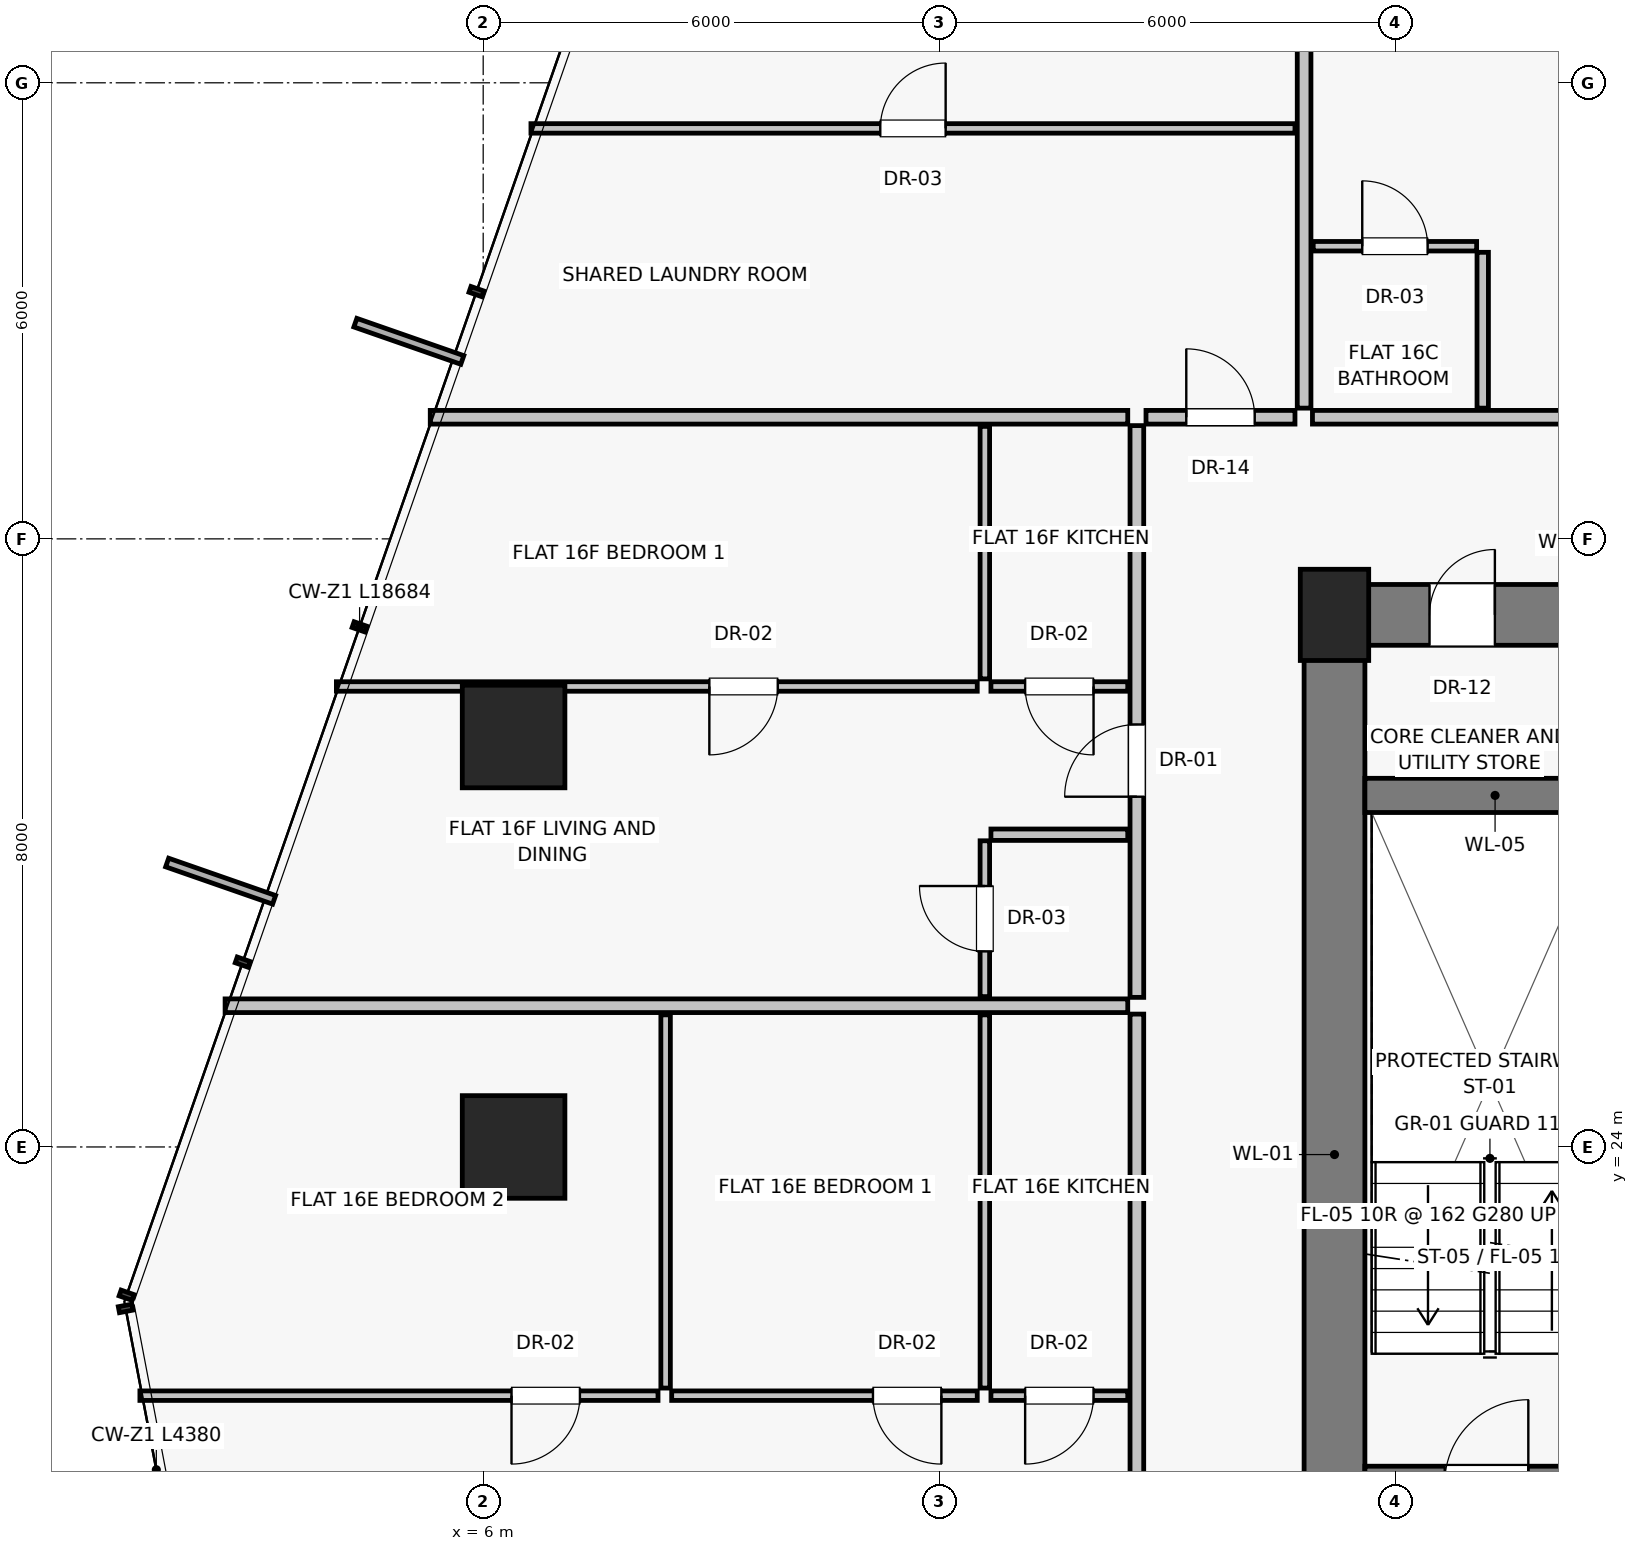
"""IFC4 building model, lengths in metres.
Left out: names, types, materials, properties, quantities, classifications, styles, units other than length and angle.
Written with IfcOpenShell. Run it as: python <this file> out.ifc"""

import sys

from ifc_helpers import new_model, si_unit, direction, frame, frame_2d, origin, origin_2d, place, context, subcontext, project, spatial, rectangle, extrude, source, transform, mapped, element, fill, save


model = new_model("IFC4")
c1 = context("Model", 3, precision=1e-05, world=origin(), true_north=direction((0.0, 1.0)))
c2 = subcontext(c1, "Body", "Model", "MODEL_VIEW")
j1 = project(units=[si_unit("LENGTHUNIT", "METRE"), si_unit("PLANEANGLEUNIT", "RADIAN")], contexts=[c1])
p1 = place(None, origin())
s1 = spatial("IfcSite", under=j1, at=p1, CompositionType="ELEMENT")
p2 = place(p1, origin())
s2 = spatial("IfcBuilding", under=s1, at=p2, CompositionType="ELEMENT")
p3 = place(p2, frame((0.0, 0.0, 60.85)))
s3 = spatial("IfcBuildingStorey", under=s2, at=p3, CompositionType="ELEMENT", Elevation=60.85)
p4 = place(p3, frame((17.2, 31.0, 0.0), z_axis=(0.0, 0.0, 1.0), x_axis=(1.0, 0.0, 0.0)))
e1 = element("IfcColumn", 1, at=p4, inside=s3, PredefinedType="PILASTER", context=c2, shape_type="SweptSolid", body=[
    extrude(rectangle(XDim=0.9, YDim=1.2, at=origin_2d()), origin(), (0.0, 0.0, 1.0), 3.25),
])
for number, where, z_axis, x_axis in (
    (2, (6.4, 29.4, 0.0), (0.0, 0.0, 1.0), (1.0, 0.0, 0.0)),
    (3, (6.4, 24.0, 0.0), (0.0, 0.0, 1.0), (1.0, 0.0, 0.0)),
):
    element("IfcColumn", number, at=place(p3, frame(where, z_axis=z_axis, x_axis=x_axis)), inside=s3, PredefinedType="COLUMN", context=c2, shape_type="SweptSolid", body=[
        extrude(rectangle(XDim=1.35, YDim=1.35, at=origin_2d()), origin(), (0.0, 0.0, 1.0), 3.25),
    ])
p5 = place(p3, frame((17.2, 16.8, 0.0), z_axis=(0.0, 0.0, 1.0), x_axis=(0.0, 1.0, 0.0)))
e4 = element("IfcWall", 4, at=p5, inside=s3, PredefinedType="SHEAR", context=c2, shape_type="SweptSolid", body=[
    extrude(rectangle(XDim=14.2, YDim=0.8, at=frame_2d((7.1, 0.0))), origin(), (0.0, 0.0, 1.0), 3.0),
])
p6 = place(p3, frame((17.2, 31.0, 0.0), z_axis=(0.0, 0.0, 1.0), x_axis=(1.0, 0.0, 0.0)))
e5 = element("IfcWall", 5, at=p6, inside=s3, PredefinedType="SHEAR", context=c2, shape_type="SweptSolid", body=[
    extrude(rectangle(XDim=3.8, YDim=0.8, at=frame_2d((1.9, 0.0))), origin(), (0.0, 0.0, 1.0), 3.0),
])
p7 = place(p6, frame((1.25, 0.0, 0.0)))
e6 = element("IfcOpeningElement", 6, at=p7, cuts=e5, PredefinedType="OPENING", context=c2, shape_type="SweptSolid", body=[
    extrude(rectangle(XDim=0.86, YDim=2.01, at=frame_2d((0.43, 1.005))), frame((0.0, 0.41, 0.0), z_axis=(0.0, -1.0, 0.0), x_axis=(1.0, 0.0, 0.0)), (0.0, 0.0, 1.0), 0.82),
])
p8 = place(p3, frame((17.6, 19.575, 0.0), z_axis=(0.0, 0.0, 1.0), x_axis=(1.0, 0.0, 0.0)))
e7 = element("IfcWall", 7, at=p8, inside=s3, PredefinedType="SHEAR", context=c2, shape_type="SweptSolid", body=[
    extrude(rectangle(XDim=3.425, YDim=0.45, at=frame_2d((1.712, 0.0))), origin(), (0.0, 0.0, 1.0), 3.0),
])
p9 = place(p8, frame((1.05, 0.0, 0.0)))
e8 = element("IfcOpeningElement", 8, at=p9, cuts=e7, PredefinedType="OPENING", context=c2, shape_type="SweptSolid", body=[
    extrude(rectangle(XDim=1.1, YDim=2.03, at=frame_2d((0.55, 1.015))), frame((0.0, 0.235, 0.0), z_axis=(0.0, -1.0, 0.0), x_axis=(1.0, 0.0, 0.0)), (0.0, 0.0, 1.0), 0.47),
])
p10 = place(p3, frame((17.6, 28.625, 0.0), z_axis=(0.0, 0.0, 1.0), x_axis=(1.0, 0.0, 0.0)))
e9 = element("IfcWall", 9, at=p10, inside=s3, PredefinedType="SHEAR", context=c2, shape_type="SweptSolid", body=[
    extrude(rectangle(XDim=3.425, YDim=0.45, at=frame_2d((1.712, 0.0))), origin(), (0.0, 0.0, 1.0), 3.0),
])
p11 = place(p3, frame((16.8, 33.72, 0.0), z_axis=(0.0, 0.0, 1.0), x_axis=(0.0, 1.0, 0.0)))
e10 = element("IfcWall", 10, at=p11, inside=s3, PredefinedType="PARTITIONING", context=c2, shape_type="SweptSolid", body=[
    extrude(rectangle(XDim=10.098, YDim=0.18, at=frame_2d((5.049, 0.0))), origin(), (0.0, 0.0, 1.0), 3.0),
])
p12 = place(p3, frame((16.91, 33.6, 0.0), z_axis=(0.0, 0.0, 1.0), x_axis=(1.0, 0.0, 0.0)))
e11 = element("IfcWall", 11, at=p12, inside=s3, PredefinedType="PARTITIONING", context=c2, shape_type="SweptSolid", body=[
    extrude(rectangle(XDim=5.638, YDim=0.18, at=frame_2d((2.819, 0.0))), origin(), (0.0, 0.0, 1.0), 3.0),
])
p13 = place(p12, frame((3.373, 0.0, 0.0)))
e12 = element("IfcOpeningElement", 12, at=p13, cuts=e11, PredefinedType="OPENING", context=c2, shape_type="SweptSolid", body=[
    extrude(rectangle(XDim=0.95, YDim=2.02, at=frame_2d((0.475, 1.01))), frame((0.0, 0.1, 0.0), z_axis=(0.0, -1.0, 0.0), x_axis=(1.0, 0.0, 0.0)), (0.0, 0.0, 1.0), 0.2),
])
p14 = place(p3, frame((19.15, 33.72, 0.0), z_axis=(0.0, 0.0, 1.0), x_axis=(0.0, 1.0, 0.0)))
e13 = element("IfcWall", 13, at=p14, inside=s3, PredefinedType="PARTITIONING", context=c2, shape_type="SweptSolid", body=[
    extrude(rectangle(XDim=2.05, YDim=0.15, at=frame_2d((1.025, 0.0))), origin(), (0.0, 0.0, 1.0), 3.0),
])
p15 = place(p3, frame((16.92, 35.85, 0.0), z_axis=(0.0, 0.0, 1.0), x_axis=(1.0, 0.0, 0.0)))
e14 = element("IfcWall", 14, at=p15, inside=s3, PredefinedType="PARTITIONING", context=c2, shape_type="SweptSolid", body=[
    extrude(rectangle(XDim=2.15, YDim=0.125, at=frame_2d((1.075, 0.0))), origin(), (0.0, 0.0, 1.0), 3.0),
])
p16 = place(p15, frame((0.645, 0.0, 0.0)))
e15 = element("IfcOpeningElement", 15, at=p16, cuts=e14, PredefinedType="OPENING", context=c2, shape_type="SweptSolid", body=[
    extrude(rectangle(XDim=0.86, YDim=2.01, at=frame_2d((0.43, 1.005))), frame((0.0, 0.073, 0.0), z_axis=(0.0, -1.0, 0.0), x_axis=(1.0, 0.0, 0.0)), (0.0, 0.0, 1.0), 0.145),
])
p17 = place(p3, frame((14.48, 33.6, 0.0), z_axis=(0.0, 0.0, 1.0), x_axis=(-1.0, 0.0, 0.0)))
e16 = element("IfcWall", 16, at=p17, inside=s3, PredefinedType="PARTITIONING", context=c2, shape_type="SweptSolid", body=[
    extrude(rectangle(XDim=9.176, YDim=0.18, at=frame_2d((4.588, 0.0))), origin(), (0.0, 0.0, 1.0), 3.0),
])
p18 = place(p3, frame((14.6, 14.31, 0.0), z_axis=(0.0, 0.0, 1.0), x_axis=(0.0, 1.0, 0.0)))
e17 = element("IfcWall", 17, at=p18, inside=s3, PredefinedType="PARTITIONING", context=c2, shape_type="SweptSolid", body=[
    extrude(rectangle(XDim=11.438, YDim=0.18, at=frame_2d((5.719, 0.0))), origin(), (0.0, 0.0, 1.0), 3.0),
])
p19 = place(p18, frame((3.804, 0.0, 0.0)))
e18 = element("IfcOpeningElement", 18, at=p19, cuts=e17, PredefinedType="OPENING", context=c2, shape_type="SweptSolid", body=[
    extrude(rectangle(XDim=0.95, YDim=2.02, at=frame_2d((0.475, 1.01))), frame((0.0, 0.1, 0.0), z_axis=(0.0, -1.0, 0.0), x_axis=(1.0, 0.0, 0.0)), (0.0, 0.0, 1.0), 0.2),
])
p20 = place(p3, frame((14.48, 20.728, 0.0), z_axis=(0.0, 0.0, 1.0), x_axis=(-1.0, 0.0, 0.0)))
e19 = element("IfcWall", 19, at=p20, inside=s3, PredefinedType="PARTITIONING", context=c2, shape_type="SweptSolid", body=[
    extrude(rectangle(XDim=1.8, YDim=0.125, at=frame_2d((0.9, 0.0))), origin(), (0.0, 0.0, 1.0), 3.0),
])
p21 = place(p20, frame((0.45, 0.0, 0.0)))
e20 = element("IfcOpeningElement", 20, at=p21, cuts=e19, PredefinedType="OPENING", context=c2, shape_type="SweptSolid", body=[
    extrude(rectangle(XDim=0.9, YDim=2.01, at=frame_2d((0.45, 1.005))), frame((0.0, 0.073, 0.0), z_axis=(0.0, -1.0, 0.0), x_axis=(1.0, 0.0, 0.0)), (0.0, 0.0, 1.0), 0.145),
])
for number, where, z_axis, x_axis in (
    (21, (12.6, 20.828, 0.0), (0.0, 0.0, 1.0), (0.0, 1.0, 0.0)),
    (22, (8.4, 20.828, 0.0), (0.0, 0.0, 1.0), (0.0, 1.0, 0.0)),
):
    element("IfcWall", number, at=place(p3, frame(where, z_axis=z_axis, x_axis=x_axis)), inside=s3, PredefinedType="PARTITIONING", context=c2, shape_type="SweptSolid", body=[
        extrude(rectangle(XDim=4.91, YDim=0.125, at=frame_2d((2.455, 0.0))), origin(), (0.0, 0.0, 1.0), 3.0),
    ])
p22 = place(p3, frame((12.5, 20.728, 0.0), z_axis=(0.0, 0.0, 1.0), x_axis=(-1.0, 0.0, 0.0)))
e23 = element("IfcWall", 23, at=p22, inside=s3, PredefinedType="PARTITIONING", context=c2, shape_type="SweptSolid", body=[
    extrude(rectangle(XDim=4.02, YDim=0.125, at=frame_2d((2.01, 0.0))), origin(), (0.0, 0.0, 1.0), 3.0),
])
p23 = place(p22, frame((0.472, 0.0, 0.0)))
e24 = element("IfcOpeningElement", 24, at=p23, cuts=e23, PredefinedType="OPENING", context=c2, shape_type="SweptSolid", body=[
    extrude(rectangle(XDim=0.9, YDim=2.01, at=frame_2d((0.45, 1.005))), frame((0.0, 0.073, 0.0), z_axis=(0.0, -1.0, 0.0), x_axis=(1.0, 0.0, 0.0)), (0.0, 0.0, 1.0), 0.145),
])
p24 = place(p3, frame((8.3, 20.728, 0.0), z_axis=(0.0, 0.0, 1.0), x_axis=(-1.0, 0.0, 0.0)))
e25 = element("IfcWall", 25, at=p24, inside=s3, PredefinedType="PARTITIONING", context=c2, shape_type="SweptSolid", body=[
    extrude(rectangle(XDim=6.816, YDim=0.125, at=frame_2d((3.408, 0.0))), origin(), (0.0, 0.0, 1.0), 3.0),
])
p25 = place(p24, frame((1.027, 0.0, 0.0)))
e26 = element("IfcOpeningElement", 26, at=p25, cuts=e25, PredefinedType="OPENING", context=c2, shape_type="SweptSolid", body=[
    extrude(rectangle(XDim=0.9, YDim=2.01, at=frame_2d((0.45, 1.005))), frame((0.0, 0.073, 0.0), z_axis=(0.0, -1.0, 0.0), x_axis=(1.0, 0.0, 0.0)), (0.0, 0.0, 1.0), 0.145),
])
p26 = place(p3, frame((14.48, 25.858, 0.0), z_axis=(0.0, 0.0, 1.0), x_axis=(-1.0, 0.0, 0.0)))
e27 = element("IfcWall", 27, at=p26, inside=s3, PredefinedType="PARTITIONING", context=c2, shape_type="SweptSolid", body=[
    extrude(rectangle(XDim=11.875, YDim=0.18, at=frame_2d((5.938, 0.0))), origin(), (0.0, 0.0, 1.0), 3.0),
])
p27 = place(p3, frame((14.6, 25.968, 0.0), z_axis=(0.0, 0.0, 1.0), x_axis=(0.0, 1.0, 0.0)))
e28 = element("IfcWall", 28, at=p27, inside=s3, PredefinedType="PARTITIONING", context=c2, shape_type="SweptSolid", body=[
    extrude(rectangle(XDim=7.522, YDim=0.18, at=frame_2d((3.761, 0.0))), origin(), (0.0, 0.0, 1.0), 3.0),
])
p28 = place(p27, frame((2.64, 0.0, 0.0)))
e29 = element("IfcOpeningElement", 29, at=p28, cuts=e28, PredefinedType="OPENING", context=c2, shape_type="SweptSolid", body=[
    extrude(rectangle(XDim=0.95, YDim=2.02, at=frame_2d((0.475, 1.01))), frame((0.0, 0.1, 0.0), z_axis=(0.0, -1.0, 0.0), x_axis=(1.0, 0.0, 0.0)), (0.0, 0.0, 1.0), 0.2),
])
p29 = place(p3, frame((14.48, 28.108, 0.0), z_axis=(0.0, 0.0, 1.0), x_axis=(-1.0, 0.0, 0.0)))
e30 = element("IfcWall", 30, at=p29, inside=s3, PredefinedType="PARTITIONING", context=c2, shape_type="SweptSolid", body=[
    extrude(rectangle(XDim=1.8, YDim=0.15, at=frame_2d((0.9, 0.0))), origin(), (0.0, 0.0, 1.0), 3.0),
])
p30 = place(p3, frame((12.6, 25.978, 0.0), z_axis=(0.0, 0.0, 1.0), x_axis=(0.0, 1.0, 0.0)))
e31 = element("IfcWall", 31, at=p30, inside=s3, PredefinedType="PARTITIONING", context=c2, shape_type="SweptSolid", body=[
    extrude(rectangle(XDim=2.05, YDim=0.125, at=frame_2d((1.025, 0.0))), origin(), (0.0, 0.0, 1.0), 3.0),
])
p31 = place(p30, frame((0.595, 0.0, 0.0)))
e32 = element("IfcOpeningElement", 32, at=p31, cuts=e31, PredefinedType="OPENING", context=c2, shape_type="SweptSolid", body=[
    extrude(rectangle(XDim=0.86, YDim=2.01, at=frame_2d((0.43, 1.005))), frame((0.0, 0.073, 0.0), z_axis=(0.0, -1.0, 0.0), x_axis=(1.0, 0.0, 0.0)), (0.0, 0.0, 1.0), 0.145),
])
p32 = place(p3, frame((14.48, 30.058, 0.0), z_axis=(0.0, 0.0, 1.0), x_axis=(-1.0, 0.0, 0.0)))
e33 = element("IfcWall", 33, at=p32, inside=s3, PredefinedType="PARTITIONING", context=c2, shape_type="SweptSolid", body=[
    extrude(rectangle(XDim=1.8, YDim=0.125, at=frame_2d((0.9, 0.0))), origin(), (0.0, 0.0, 1.0), 2.299),
])
p33 = place(p32, frame((0.45, 0.0, 0.0)))
e34 = element("IfcOpeningElement", 34, at=p33, cuts=e33, PredefinedType="OPENING", context=c2, shape_type="SweptSolid", body=[
    extrude(rectangle(XDim=0.9, YDim=2.01, at=frame_2d((0.45, 1.005))), frame((0.0, 0.073, 0.0), z_axis=(0.0, -1.0, 0.0), x_axis=(1.0, 0.0, 0.0)), (0.0, 0.0, 1.0), 0.145),
])
p34 = place(p3, frame((12.6, 30.158, 0.0), z_axis=(0.0, 0.0, 1.0), x_axis=(0.0, 1.0, 0.0)))
e35 = element("IfcWall", 35, at=p34, inside=s3, PredefinedType="PARTITIONING", context=c2, shape_type="SweptSolid", body=[
    extrude(rectangle(XDim=3.322, YDim=0.125, at=frame_2d((1.661, 0.0))), origin(), (0.0, 0.0, 1.0), 3.0),
])
p35 = place(p3, frame((12.5, 30.058, 0.0), z_axis=(0.0, 0.0, 1.0), x_axis=(-1.0, 0.0, 0.0)))
e36 = element("IfcWall", 36, at=p35, inside=s3, PredefinedType="PARTITIONING", context=c2, shape_type="SweptSolid", body=[
    extrude(rectangle(XDim=8.431, YDim=0.125, at=frame_2d((4.216, 0.0))), origin(), (0.0, 0.0, 1.0), 2.299),
])
p36 = place(p35, frame((2.625, 0.0, 0.0)))
e37 = element("IfcOpeningElement", 37, at=p36, cuts=e36, PredefinedType="OPENING", context=c2, shape_type="SweptSolid", body=[
    extrude(rectangle(XDim=0.9, YDim=2.01, at=frame_2d((0.45, 1.005))), frame((0.0, 0.073, 0.0), z_axis=(0.0, -1.0, 0.0), x_axis=(1.0, 0.0, 0.0)), (0.0, 0.0, 1.0), 0.145),
])
p37 = place(p3, frame((14.72, 33.6, 0.0), z_axis=(0.0, 0.0, 1.0), x_axis=(1.0, 0.0, 0.0)))
e38 = element("IfcWall", 38, at=p37, inside=s3, PredefinedType="PARTITIONING", context=c2, shape_type="SweptSolid", body=[
    extrude(rectangle(XDim=1.96, YDim=0.18, at=frame_2d((0.98, 0.0))), origin(), (0.0, 0.0, 1.0), 3.0),
])
p38 = place(p37, frame((0.53, 0.0, 0.0)))
e39 = element("IfcOpeningElement", 39, at=p38, cuts=e38, PredefinedType="OPENING", context=c2, shape_type="SweptSolid", body=[
    extrude(rectangle(XDim=0.9, YDim=2.01, at=frame_2d((0.45, 1.005))), frame((0.0, 0.1, 0.0), z_axis=(0.0, -1.0, 0.0), x_axis=(1.0, 0.0, 0.0)), (0.0, 0.0, 1.0), 0.2),
])
p39 = place(p3, frame((6.628, 37.4, 0.0), z_axis=(0.0, 0.0, 1.0), x_axis=(1.0, 0.0, 0.0)))
e40 = element("IfcWall", 40, at=p39, inside=s3, PredefinedType="PARTITIONING", context=c2, shape_type="SweptSolid", body=[
    extrude(rectangle(XDim=10.052, YDim=0.125, at=frame_2d((5.026, 0.0))), origin(), (0.0, 0.0, 1.0), 3.0),
])
p40 = place(p39, frame((4.596, 0.0, 0.0)))
e41 = element("IfcOpeningElement", 41, at=p40, cuts=e40, PredefinedType="OPENING", context=c2, shape_type="SweptSolid", body=[
    extrude(rectangle(XDim=0.86, YDim=2.01, at=frame_2d((0.43, 1.005))), frame((0.0, 0.073, 0.0), z_axis=(0.0, -1.0, 0.0), x_axis=(1.0, 0.0, 0.0)), (0.0, 0.0, 1.0), 0.145),
])
m1 = source(origin(), c2, "Body", "SweptSolid", [
    extrude(rectangle(XDim=0.86, YDim=2.01, at=frame_2d((0.43, 1.005))), frame((0.0, 0.025, 0.0), z_axis=(0.0, -1.0, 0.0), x_axis=(1.0, 0.0, 0.0)), (0.0, 0.0, 1.0), 0.05),
])
p41 = place(p7, origin())
e42 = element("IfcDoor", 42, at=p41, inside=s3, OperationType="SINGLE_SWING_RIGHT", PredefinedType="DOOR", context=c2, shape_type="MappedRepresentation", body=[
    mapped(m1, transform((0.0, 0.0, 0.0), scale=1.0)),
])
fill(e6, e42)
p42 = place(p16, origin())
e43 = element("IfcDoor", 43, at=p42, inside=s3, OperationType="SINGLE_SWING_LEFT", PredefinedType="DOOR", context=c2, shape_type="MappedRepresentation", body=[
    mapped(m1, transform((0.0, 0.0, 0.0), scale=1.0)),
])
fill(e15, e43)
m2 = source(origin(), c2, "Body", "SweptSolid", [
    extrude(rectangle(XDim=0.9, YDim=2.01, at=frame_2d((0.45, 1.005))), frame((0.0, 0.025, 0.0), z_axis=(0.0, -1.0, 0.0), x_axis=(1.0, 0.0, 0.0)), (0.0, 0.0, 1.0), 0.05),
])
p43 = place(p21, origin())
e44 = element("IfcDoor", 44, at=p43, inside=s3, OperationType="SINGLE_SWING_RIGHT", PredefinedType="DOOR", context=c2, shape_type="MappedRepresentation", body=[
    mapped(m2, transform((0.0, 0.0, 0.0), scale=1.0)),
])
fill(e20, e44)
p44 = place(p23, origin())
e45 = element("IfcDoor", 45, at=p44, inside=s3, OperationType="SINGLE_SWING_LEFT", PredefinedType="DOOR", context=c2, shape_type="MappedRepresentation", body=[
    mapped(m2, transform((0.0, 0.0, 0.0), scale=1.0)),
])
fill(e24, e45)
p45 = place(p25, origin())
e46 = element("IfcDoor", 46, at=p45, inside=s3, OperationType="SINGLE_SWING_RIGHT", PredefinedType="DOOR", context=c2, shape_type="MappedRepresentation", body=[
    mapped(m2, transform((0.0, 0.0, 0.0), scale=1.0)),
])
fill(e26, e46)
m3 = source(origin(), c2, "Body", "SweptSolid", [
    extrude(rectangle(XDim=0.95, YDim=2.02, at=frame_2d((0.475, 1.01))), frame((0.0, 0.025, 0.0), z_axis=(0.0, -1.0, 0.0), x_axis=(1.0, 0.0, 0.0)), (0.0, 0.0, 1.0), 0.05),
])
p46 = place(p28, origin())
e47 = element("IfcDoor", 47, at=p46, inside=s3, OperationType="SINGLE_SWING_LEFT", PredefinedType="DOOR", context=c2, shape_type="MappedRepresentation", body=[
    mapped(m3, transform((0.0, 0.0, 0.0), scale=1.0)),
])
fill(e29, e47)
p47 = place(p31, origin())
e48 = element("IfcDoor", 48, at=p47, inside=s3, OperationType="SINGLE_SWING_RIGHT", PredefinedType="DOOR", context=c2, shape_type="MappedRepresentation", body=[
    mapped(m1, transform((0.0, 0.0, 0.0), scale=1.0)),
])
fill(e32, e48)
p48 = place(p33, origin())
e49 = element("IfcDoor", 49, at=p48, inside=s3, OperationType="SINGLE_SWING_LEFT", PredefinedType="DOOR", context=c2, shape_type="MappedRepresentation", body=[
    mapped(m2, transform((0.0, 0.0, 0.0), scale=1.0)),
])
fill(e34, e49)
p49 = place(p36, origin())
e50 = element("IfcDoor", 50, at=p49, inside=s3, OperationType="SINGLE_SWING_RIGHT", PredefinedType="DOOR", context=c2, shape_type="MappedRepresentation", body=[
    mapped(m2, transform((0.0, 0.0, 0.0), scale=1.0)),
])
fill(e37, e50)
p50 = place(p38, origin())
e51 = element("IfcDoor", 51, at=p50, inside=s3, OperationType="SINGLE_SWING_LEFT", PredefinedType="DOOR", context=c2, shape_type="MappedRepresentation", body=[
    mapped(m2, transform((0.0, 0.0, 0.0), scale=1.0)),
])
fill(e39, e51)
p51 = place(p40, origin())
e52 = element("IfcDoor", 52, at=p51, inside=s3, OperationType="SINGLE_SWING_RIGHT", PredefinedType="DOOR", context=c2, shape_type="MappedRepresentation", body=[
    mapped(m1, transform((0.0, 0.0, 0.0), scale=1.0)),
])
fill(e41, e52)
save(model, sys.argv[1])
